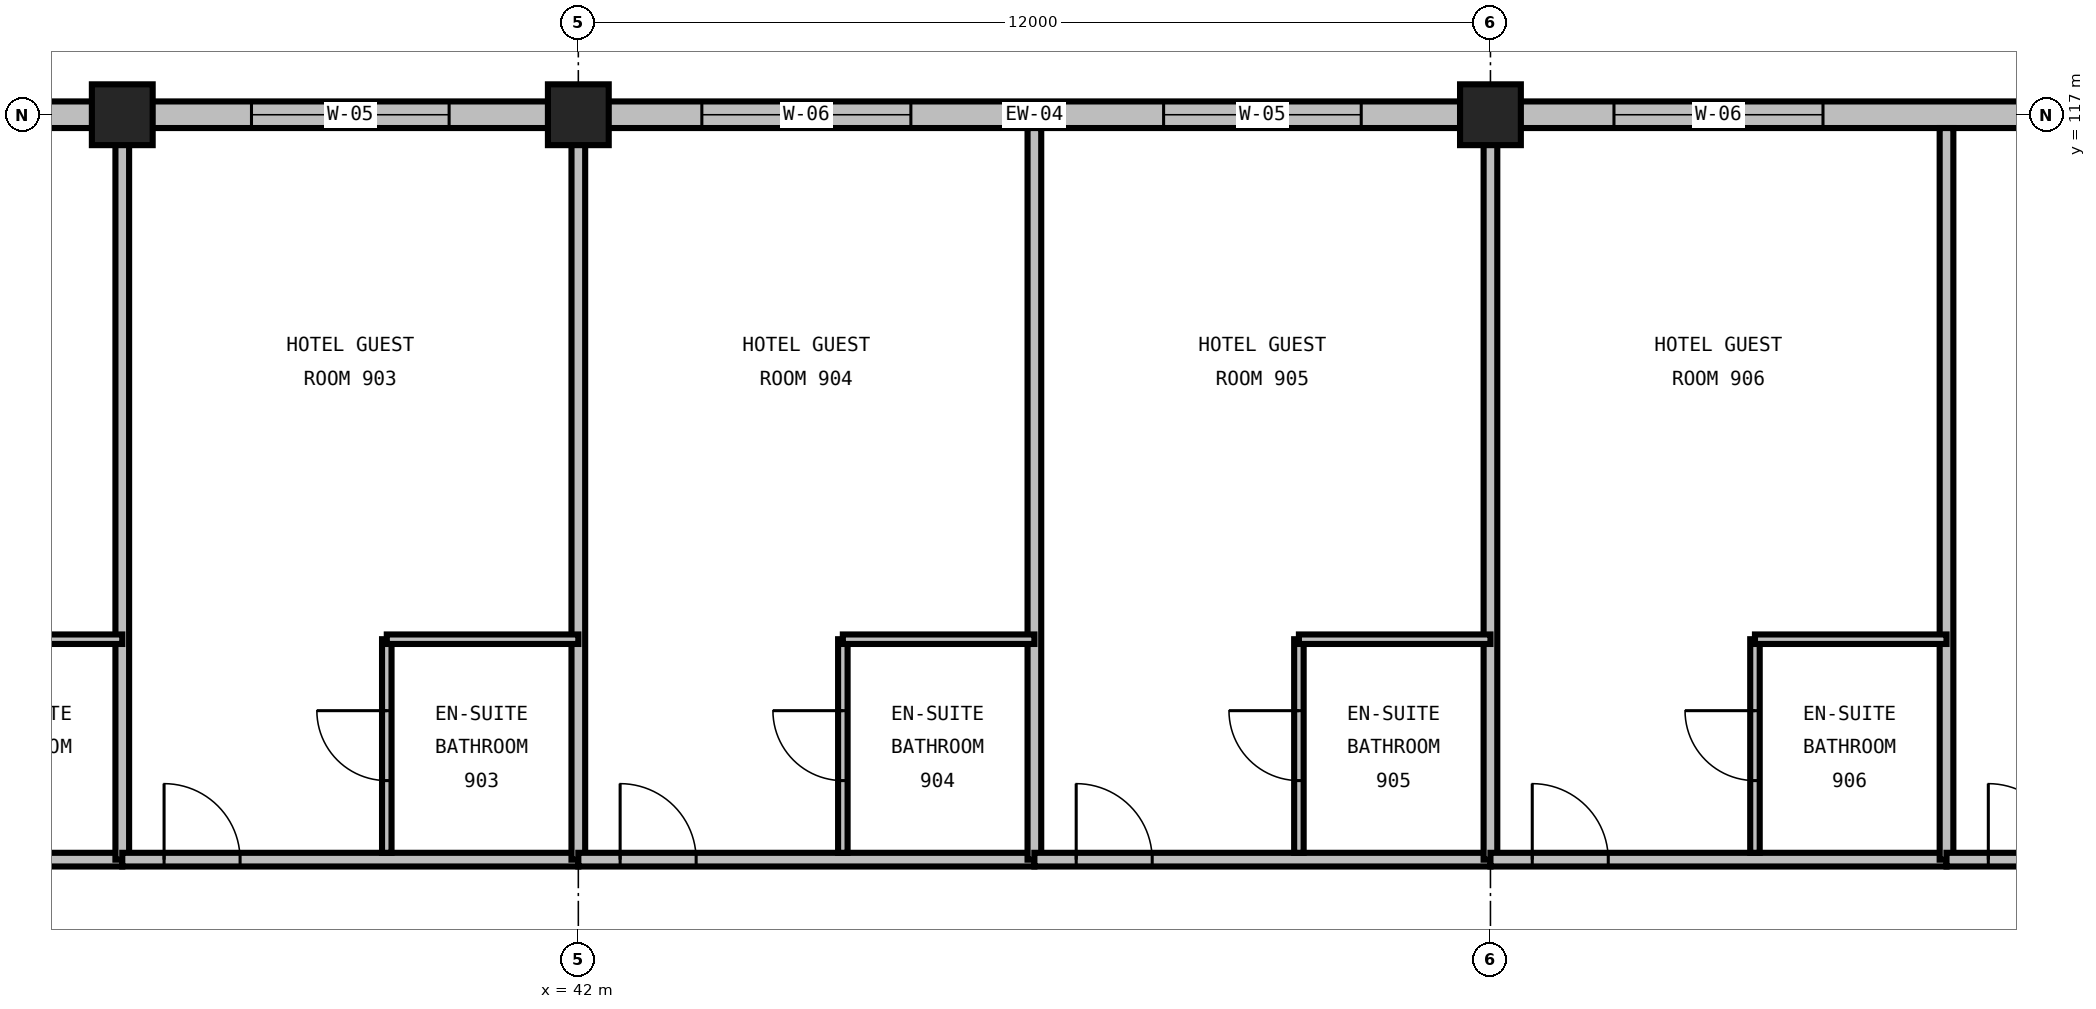
"""IFC4 building model, lengths in metres.
Left out: names, types, materials, properties, quantities, classifications, styles, units other than length and angle.
Written with IfcOpenShell. Run it as: python <this file> out.ifc"""

import sys

from ifc_helpers import new_model, si_unit, direction, frame, frame_2d, origin, origin_2d, place, context, subcontext, project, spatial, rectangle, extrude, element, fill, save


model = new_model("IFC4")
c1 = context("Model", 3, precision=1e-05, world=origin(), true_north=direction((0.0, 1.0)))
c2 = subcontext(c1, "Body", "Model", "MODEL_VIEW")
j1 = project(units=[si_unit("LENGTHUNIT", "METRE"), si_unit("PLANEANGLEUNIT", "RADIAN")], contexts=[c1])
p1 = place(None, origin())
s1 = spatial("IfcSite", under=j1, at=p1, CompositionType="ELEMENT")
p2 = place(p1, origin())
s2 = spatial("IfcBuilding", under=s1, at=p2, CompositionType="ELEMENT")
p3 = place(p2, frame((0.0, 0.0, 42.0)))
s3 = spatial("IfcBuildingStorey", under=s2, at=p3, CompositionType="ELEMENT", Elevation=42.0)
for number, where, z_axis, x_axis in (
    (1, (36.0, 117.0, 0.0), (0.0, 0.0, 1.0), (1.0, 0.0, 0.0)),
    (2, (42.0, 117.0, 0.0), (0.0, 0.0, 1.0), (1.0, 0.0, 0.0)),
    (3, (54.0, 117.0, 0.0), (0.0, 0.0, 1.0), (1.0, 0.0, 0.0)),
):
    element("IfcColumn", number, at=place(p3, frame(where, z_axis=z_axis, x_axis=x_axis)), inside=s3, PredefinedType="COLUMN", context=c2, shape_type="SweptSolid", body=[
        extrude(rectangle(XDim=0.8, YDim=0.8, at=origin_2d()), origin(), (0.0, 0.0, 1.0), 3.6),
    ])
p4 = place(p3, frame((36.0, 117.0, 0.0), z_axis=(0.0, 0.0, 1.0), x_axis=(-1.0, 0.0, 0.0)))
e4 = element("IfcWall", 4, at=p4, inside=s3, PredefinedType="STANDARD", context=c2, shape_type="SweptSolid", body=[
    extrude(rectangle(XDim=6.0, YDim=0.35, at=frame_2d((3.0, 0.0))), origin(), (0.0, 0.0, 1.0), 2.486),
])
p5 = place(p4, frame((1.7, 0.0, 0.72)))
e5 = element("IfcOpeningElement", 5, at=p5, cuts=e4, PredefinedType="OPENING", context=c2, shape_type="SweptSolid", body=[
    extrude(rectangle(XDim=2.6, YDim=1.69, at=frame_2d((1.3, 0.845))), frame((0.0, 0.19, 0.0), z_axis=(0.0, -1.0, 0.0), x_axis=(1.0, 0.0, 0.0)), (0.0, 0.0, 1.0), 0.38),
])
p6 = place(p3, frame((42.0, 117.0, 0.0), z_axis=(0.0, 0.0, 1.0), x_axis=(-1.0, 0.0, 0.0)))
e6 = element("IfcWall", 6, at=p6, inside=s3, PredefinedType="STANDARD", context=c2, shape_type="SweptSolid", body=[
    extrude(rectangle(XDim=6.0, YDim=0.35, at=frame_2d((3.0, 0.0))), origin(), (0.0, 0.0, 1.0), 2.486),
])
p7 = place(p6, frame((1.7, 0.0, 0.72)))
e7 = element("IfcOpeningElement", 7, at=p7, cuts=e6, PredefinedType="OPENING", context=c2, shape_type="SweptSolid", body=[
    extrude(rectangle(XDim=2.6, YDim=1.69, at=frame_2d((1.3, 0.845))), frame((0.0, 0.19, 0.0), z_axis=(0.0, -1.0, 0.0), x_axis=(1.0, 0.0, 0.0)), (0.0, 0.0, 1.0), 0.38),
])
p8 = place(p3, frame((54.0, 117.0, 0.0), z_axis=(0.0, 0.0, 1.0), x_axis=(-1.0, 0.0, 0.0)))
e8 = element("IfcWall", 8, at=p8, inside=s3, PredefinedType="STANDARD", context=c2, shape_type="SweptSolid", body=[
    extrude(rectangle(XDim=12.0, YDim=0.35, at=frame_2d((6.0, 0.0))), origin(), (0.0, 0.0, 1.0), 2.486),
])
p9 = place(p8, frame((1.7, 0.0, 0.72)))
e9 = element("IfcOpeningElement", 9, at=p9, cuts=e8, PredefinedType="OPENING", context=c2, shape_type="SweptSolid", body=[
    extrude(rectangle(XDim=2.6, YDim=1.69, at=frame_2d((1.3, 0.845))), frame((0.0, 0.19, 0.0), z_axis=(0.0, -1.0, 0.0), x_axis=(1.0, 0.0, 0.0)), (0.0, 0.0, 1.0), 0.38),
])
p10 = place(p8, frame((7.625, 0.0, 0.72)))
e10 = element("IfcOpeningElement", 10, at=p10, cuts=e8, PredefinedType="OPENING", context=c2, shape_type="SweptSolid", body=[
    extrude(rectangle(XDim=2.75, YDim=1.69, at=frame_2d((1.375, 0.845))), frame((0.0, 0.19, 0.0), z_axis=(0.0, -1.0, 0.0), x_axis=(1.0, 0.0, 0.0)), (0.0, 0.0, 1.0), 0.38),
])
p11 = place(p3, frame((66.0, 117.0, 0.0), z_axis=(0.0, 0.0, 1.0), x_axis=(-1.0, 0.0, 0.0)))
e11 = element("IfcWall", 11, at=p11, inside=s3, PredefinedType="STANDARD", context=c2, shape_type="SweptSolid", body=[
    extrude(rectangle(XDim=12.0, YDim=0.35, at=frame_2d((6.0, 0.0))), origin(), (0.0, 0.0, 1.0), 2.486),
])
p12 = place(p11, frame((1.7, 0.0, 0.72)))
e12 = element("IfcOpeningElement", 12, at=p12, cuts=e11, PredefinedType="OPENING", context=c2, shape_type="SweptSolid", body=[
    extrude(rectangle(XDim=2.6, YDim=1.69, at=frame_2d((1.3, 0.845))), frame((0.0, 0.19, 0.0), z_axis=(0.0, -1.0, 0.0), x_axis=(1.0, 0.0, 0.0)), (0.0, 0.0, 1.0), 0.38),
])
p13 = place(p11, frame((7.625, 0.0, 0.72)))
e13 = element("IfcOpeningElement", 13, at=p13, cuts=e11, PredefinedType="OPENING", context=c2, shape_type="SweptSolid", body=[
    extrude(rectangle(XDim=2.75, YDim=1.69, at=frame_2d((1.375, 0.845))), frame((0.0, 0.19, 0.0), z_axis=(0.0, -1.0, 0.0), x_axis=(1.0, 0.0, 0.0)), (0.0, 0.0, 1.0), 0.38),
])
p14 = place(p3, frame((30.0, 107.2, 0.0), z_axis=(0.0, 0.0, 1.0), x_axis=(1.0, 0.0, 0.0)))
e14 = element("IfcWall", 14, at=p14, inside=s3, PredefinedType="PARTITIONING", context=c2, shape_type="SweptSolid", body=[
    extrude(rectangle(XDim=6.0, YDim=0.18, at=frame_2d((3.0, 0.0))), origin(), (0.0, 0.0, 1.0), 3.29),
])
p15 = place(p14, frame((0.55, 0.0, 0.0)))
e15 = element("IfcOpeningElement", 15, at=p15, cuts=e14, PredefinedType="OPENING", context=c2, shape_type="SweptSolid", body=[
    extrude(rectangle(XDim=1.0, YDim=2.15, at=frame_2d((0.5, 1.075))), frame((0.0, 0.105, 0.0), z_axis=(0.0, -1.0, 0.0), x_axis=(1.0, 0.0, 0.0)), (0.0, 0.0, 1.0), 0.21),
])
p16 = place(p3, frame((36.0, 107.2, 0.0), z_axis=(0.0, 0.0, 1.0), x_axis=(0.0, 1.0, 0.0)))
e16 = element("IfcWall", 16, at=p16, inside=s3, PredefinedType="PARTITIONING", context=c2, shape_type="SweptSolid", body=[
    extrude(rectangle(XDim=9.625, YDim=0.18, at=frame_2d((4.812, 0.0))), origin(), (0.0, 0.0, 1.0), 2.59),
])
p17 = place(p3, frame((33.48, 110.1, 0.0), z_axis=(0.0, 0.0, 1.0), x_axis=(1.0, 0.0, 0.0)))
e17 = element("IfcWall", 17, at=p17, inside=s3, PredefinedType="PARTITIONING", context=c2, shape_type="SweptSolid", body=[
    extrude(rectangle(XDim=2.52, YDim=0.125, at=frame_2d((1.26, 0.0))), origin(), (0.0, 0.0, 1.0), 3.29),
])
p18 = place(p3, frame((36.0, 107.2, 0.0), z_axis=(0.0, 0.0, 1.0), x_axis=(1.0, 0.0, 0.0)))
e18 = element("IfcWall", 18, at=p18, inside=s3, PredefinedType="PARTITIONING", context=c2, shape_type="SweptSolid", body=[
    extrude(rectangle(XDim=6.0, YDim=0.18, at=frame_2d((3.0, 0.0))), origin(), (0.0, 0.0, 1.0), 3.29),
])
p19 = place(p18, frame((0.55, 0.0, 0.0)))
e19 = element("IfcOpeningElement", 19, at=p19, cuts=e18, PredefinedType="OPENING", context=c2, shape_type="SweptSolid", body=[
    extrude(rectangle(XDim=1.0, YDim=2.15, at=frame_2d((0.5, 1.075))), frame((0.0, 0.105, 0.0), z_axis=(0.0, -1.0, 0.0), x_axis=(1.0, 0.0, 0.0)), (0.0, 0.0, 1.0), 0.21),
])
p20 = place(p3, frame((42.0, 107.2, 0.0), z_axis=(0.0, 0.0, 1.0), x_axis=(0.0, 1.0, 0.0)))
e20 = element("IfcWall", 20, at=p20, inside=s3, PredefinedType="PARTITIONING", context=c2, shape_type="SweptSolid", body=[
    extrude(rectangle(XDim=9.625, YDim=0.18, at=frame_2d((4.812, 0.0))), origin(), (0.0, 0.0, 1.0), 2.59),
])
p21 = place(p3, frame((39.48, 107.29, 0.0), z_axis=(0.0, 0.0, 1.0), x_axis=(0.0, 1.0, 0.0)))
e21 = element("IfcWall", 21, at=p21, inside=s3, PredefinedType="PARTITIONING", context=c2, shape_type="SweptSolid", body=[
    extrude(rectangle(XDim=2.81, YDim=0.125, at=frame_2d((1.405, 0.0))), origin(), (0.0, 0.0, 1.0), 3.29),
])
p22 = place(p21, frame((0.95, 0.0, 0.0)))
e22 = element("IfcOpeningElement", 22, at=p22, cuts=e21, PredefinedType="OPENING", context=c2, shape_type="SweptSolid", body=[
    extrude(rectangle(XDim=0.92, YDim=2.1, at=frame_2d((0.46, 1.05))), frame((0.0, 0.077, 0.0), z_axis=(0.0, -1.0, 0.0), x_axis=(1.0, 0.0, 0.0)), (0.0, 0.0, 1.0), 0.155),
])
p23 = place(p3, frame((39.48, 110.1, 0.0), z_axis=(0.0, 0.0, 1.0), x_axis=(1.0, 0.0, 0.0)))
e23 = element("IfcWall", 23, at=p23, inside=s3, PredefinedType="PARTITIONING", context=c2, shape_type="SweptSolid", body=[
    extrude(rectangle(XDim=2.52, YDim=0.125, at=frame_2d((1.26, 0.0))), origin(), (0.0, 0.0, 1.0), 3.29),
])
p24 = place(p3, frame((42.0, 107.2, 0.0), z_axis=(0.0, 0.0, 1.0), x_axis=(1.0, 0.0, 0.0)))
e24 = element("IfcWall", 24, at=p24, inside=s3, PredefinedType="PARTITIONING", context=c2, shape_type="SweptSolid", body=[
    extrude(rectangle(XDim=6.0, YDim=0.18, at=frame_2d((3.0, 0.0))), origin(), (0.0, 0.0, 1.0), 3.29),
])
p25 = place(p24, frame((0.55, 0.0, 0.0)))
e25 = element("IfcOpeningElement", 25, at=p25, cuts=e24, PredefinedType="OPENING", context=c2, shape_type="SweptSolid", body=[
    extrude(rectangle(XDim=1.0, YDim=2.15, at=frame_2d((0.5, 1.075))), frame((0.0, 0.105, 0.0), z_axis=(0.0, -1.0, 0.0), x_axis=(1.0, 0.0, 0.0)), (0.0, 0.0, 1.0), 0.21),
])
p26 = place(p3, frame((48.0, 107.2, 0.0), z_axis=(0.0, 0.0, 1.0), x_axis=(0.0, 1.0, 0.0)))
e26 = element("IfcWall", 26, at=p26, inside=s3, PredefinedType="PARTITIONING", context=c2, shape_type="SweptSolid", body=[
    extrude(rectangle(XDim=9.625, YDim=0.18, at=frame_2d((4.812, 0.0))), origin(), (0.0, 0.0, 1.0), 3.29),
])
p27 = place(p3, frame((45.48, 107.29, 0.0), z_axis=(0.0, 0.0, 1.0), x_axis=(0.0, 1.0, 0.0)))
e27 = element("IfcWall", 27, at=p27, inside=s3, PredefinedType="PARTITIONING", context=c2, shape_type="SweptSolid", body=[
    extrude(rectangle(XDim=2.81, YDim=0.125, at=frame_2d((1.405, 0.0))), origin(), (0.0, 0.0, 1.0), 3.29),
])
p28 = place(p27, frame((0.95, 0.0, 0.0)))
e28 = element("IfcOpeningElement", 28, at=p28, cuts=e27, PredefinedType="OPENING", context=c2, shape_type="SweptSolid", body=[
    extrude(rectangle(XDim=0.92, YDim=2.1, at=frame_2d((0.46, 1.05))), frame((0.0, 0.077, 0.0), z_axis=(0.0, -1.0, 0.0), x_axis=(1.0, 0.0, 0.0)), (0.0, 0.0, 1.0), 0.155),
])
p29 = place(p3, frame((45.48, 110.1, 0.0), z_axis=(0.0, 0.0, 1.0), x_axis=(1.0, 0.0, 0.0)))
e29 = element("IfcWall", 29, at=p29, inside=s3, PredefinedType="PARTITIONING", context=c2, shape_type="SweptSolid", body=[
    extrude(rectangle(XDim=2.52, YDim=0.125, at=frame_2d((1.26, 0.0))), origin(), (0.0, 0.0, 1.0), 3.29),
])
p30 = place(p3, frame((48.0, 107.2, 0.0), z_axis=(0.0, 0.0, 1.0), x_axis=(1.0, 0.0, 0.0)))
e30 = element("IfcWall", 30, at=p30, inside=s3, PredefinedType="PARTITIONING", context=c2, shape_type="SweptSolid", body=[
    extrude(rectangle(XDim=6.0, YDim=0.18, at=frame_2d((3.0, 0.0))), origin(), (0.0, 0.0, 1.0), 3.29),
])
p31 = place(p30, frame((0.55, 0.0, 0.0)))
e31 = element("IfcOpeningElement", 31, at=p31, cuts=e30, PredefinedType="OPENING", context=c2, shape_type="SweptSolid", body=[
    extrude(rectangle(XDim=1.0, YDim=2.15, at=frame_2d((0.5, 1.075))), frame((0.0, 0.105, 0.0), z_axis=(0.0, -1.0, 0.0), x_axis=(1.0, 0.0, 0.0)), (0.0, 0.0, 1.0), 0.21),
])
p32 = place(p3, frame((54.0, 107.2, 0.0), z_axis=(0.0, 0.0, 1.0), x_axis=(0.0, 1.0, 0.0)))
e32 = element("IfcWall", 32, at=p32, inside=s3, PredefinedType="PARTITIONING", context=c2, shape_type="SweptSolid", body=[
    extrude(rectangle(XDim=9.625, YDim=0.18, at=frame_2d((4.812, 0.0))), origin(), (0.0, 0.0, 1.0), 2.59),
])
p33 = place(p3, frame((51.48, 107.29, 0.0), z_axis=(0.0, 0.0, 1.0), x_axis=(0.0, 1.0, 0.0)))
e33 = element("IfcWall", 33, at=p33, inside=s3, PredefinedType="PARTITIONING", context=c2, shape_type="SweptSolid", body=[
    extrude(rectangle(XDim=2.81, YDim=0.125, at=frame_2d((1.405, 0.0))), origin(), (0.0, 0.0, 1.0), 3.29),
])
p34 = place(p33, frame((0.95, 0.0, 0.0)))
e34 = element("IfcOpeningElement", 34, at=p34, cuts=e33, PredefinedType="OPENING", context=c2, shape_type="SweptSolid", body=[
    extrude(rectangle(XDim=0.92, YDim=2.1, at=frame_2d((0.46, 1.05))), frame((0.0, 0.077, 0.0), z_axis=(0.0, -1.0, 0.0), x_axis=(1.0, 0.0, 0.0)), (0.0, 0.0, 1.0), 0.155),
])
p35 = place(p3, frame((51.48, 110.1, 0.0), z_axis=(0.0, 0.0, 1.0), x_axis=(1.0, 0.0, 0.0)))
e35 = element("IfcWall", 35, at=p35, inside=s3, PredefinedType="PARTITIONING", context=c2, shape_type="SweptSolid", body=[
    extrude(rectangle(XDim=2.52, YDim=0.125, at=frame_2d((1.26, 0.0))), origin(), (0.0, 0.0, 1.0), 3.29),
])
p36 = place(p3, frame((54.0, 107.2, 0.0), z_axis=(0.0, 0.0, 1.0), x_axis=(1.0, 0.0, 0.0)))
e36 = element("IfcWall", 36, at=p36, inside=s3, PredefinedType="PARTITIONING", context=c2, shape_type="SweptSolid", body=[
    extrude(rectangle(XDim=6.0, YDim=0.18, at=frame_2d((3.0, 0.0))), origin(), (0.0, 0.0, 1.0), 3.29),
])
p37 = place(p36, frame((0.55, 0.0, 0.0)))
e37 = element("IfcOpeningElement", 37, at=p37, cuts=e36, PredefinedType="OPENING", context=c2, shape_type="SweptSolid", body=[
    extrude(rectangle(XDim=1.0, YDim=2.15, at=frame_2d((0.5, 1.075))), frame((0.0, 0.105, 0.0), z_axis=(0.0, -1.0, 0.0), x_axis=(1.0, 0.0, 0.0)), (0.0, 0.0, 1.0), 0.21),
])
p38 = place(p3, frame((60.0, 107.2, 0.0), z_axis=(0.0, 0.0, 1.0), x_axis=(0.0, 1.0, 0.0)))
e38 = element("IfcWall", 38, at=p38, inside=s3, PredefinedType="PARTITIONING", context=c2, shape_type="SweptSolid", body=[
    extrude(rectangle(XDim=9.625, YDim=0.18, at=frame_2d((4.812, 0.0))), origin(), (0.0, 0.0, 1.0), 3.29),
])
p39 = place(p3, frame((57.48, 107.29, 0.0), z_axis=(0.0, 0.0, 1.0), x_axis=(0.0, 1.0, 0.0)))
e39 = element("IfcWall", 39, at=p39, inside=s3, PredefinedType="PARTITIONING", context=c2, shape_type="SweptSolid", body=[
    extrude(rectangle(XDim=2.81, YDim=0.125, at=frame_2d((1.405, 0.0))), origin(), (0.0, 0.0, 1.0), 3.29),
])
p40 = place(p39, frame((0.95, 0.0, 0.0)))
e40 = element("IfcOpeningElement", 40, at=p40, cuts=e39, PredefinedType="OPENING", context=c2, shape_type="SweptSolid", body=[
    extrude(rectangle(XDim=0.92, YDim=2.1, at=frame_2d((0.46, 1.05))), frame((0.0, 0.077, 0.0), z_axis=(0.0, -1.0, 0.0), x_axis=(1.0, 0.0, 0.0)), (0.0, 0.0, 1.0), 0.155),
])
p41 = place(p3, frame((57.48, 110.1, 0.0), z_axis=(0.0, 0.0, 1.0), x_axis=(1.0, 0.0, 0.0)))
e41 = element("IfcWall", 41, at=p41, inside=s3, PredefinedType="PARTITIONING", context=c2, shape_type="SweptSolid", body=[
    extrude(rectangle(XDim=2.52, YDim=0.125, at=frame_2d((1.26, 0.0))), origin(), (0.0, 0.0, 1.0), 3.29),
])
p42 = place(p3, frame((60.0, 107.2, 0.0), z_axis=(0.0, 0.0, 1.0), x_axis=(1.0, 0.0, 0.0)))
e42 = element("IfcWall", 42, at=p42, inside=s3, PredefinedType="PARTITIONING", context=c2, shape_type="SweptSolid", body=[
    extrude(rectangle(XDim=6.0, YDim=0.18, at=frame_2d((3.0, 0.0))), origin(), (0.0, 0.0, 1.0), 3.29),
])
p43 = place(p42, frame((0.55, 0.0, 0.0)))
e43 = element("IfcOpeningElement", 43, at=p43, cuts=e42, PredefinedType="OPENING", context=c2, shape_type="SweptSolid", body=[
    extrude(rectangle(XDim=1.0, YDim=2.15, at=frame_2d((0.5, 1.075))), frame((0.0, 0.105, 0.0), z_axis=(0.0, -1.0, 0.0), x_axis=(1.0, 0.0, 0.0)), (0.0, 0.0, 1.0), 0.21),
])
p44 = place(p7, origin())
e44 = element("IfcWindow", 44, at=p44, inside=s3, PartitioningType="DOUBLE_PANEL_VERTICAL", PredefinedType="WINDOW", context=c2, shape_type="SweptSolid", body=[
    extrude(rectangle(XDim=2.6, YDim=1.69, at=frame_2d((1.3, 0.845))), frame((0.0, 0.03, 0.0), z_axis=(0.0, -1.0, 0.0), x_axis=(1.0, 0.0, 0.0)), (0.0, 0.0, 1.0), 0.06),
])
fill(e7, e44)
p45 = place(p9, origin())
e45 = element("IfcWindow", 45, at=p45, inside=s3, PartitioningType="DOUBLE_PANEL_VERTICAL", PredefinedType="WINDOW", context=c2, shape_type="SweptSolid", body=[
    extrude(rectangle(XDim=2.6, YDim=1.69, at=frame_2d((1.3, 0.845))), frame((0.0, 0.03, 0.0), z_axis=(0.0, -1.0, 0.0), x_axis=(1.0, 0.0, 0.0)), (0.0, 0.0, 1.0), 0.06),
])
fill(e9, e45)
p46 = place(p10, origin())
e46 = element("IfcWindow", 46, at=p46, inside=s3, PartitioningType="TRIPLE_PANEL_VERTICAL", PredefinedType="WINDOW", context=c2, shape_type="SweptSolid", body=[
    extrude(rectangle(XDim=2.75, YDim=1.69, at=frame_2d((1.375, 0.845))), frame((0.0, 0.03, 0.0), z_axis=(0.0, -1.0, 0.0), x_axis=(1.0, 0.0, 0.0)), (0.0, 0.0, 1.0), 0.06),
])
fill(e10, e46)
p47 = place(p13, origin())
e47 = element("IfcWindow", 47, at=p47, inside=s3, PartitioningType="TRIPLE_PANEL_VERTICAL", PredefinedType="WINDOW", context=c2, shape_type="SweptSolid", body=[
    extrude(rectangle(XDim=2.75, YDim=1.69, at=frame_2d((1.375, 0.845))), frame((0.0, 0.03, 0.0), z_axis=(0.0, -1.0, 0.0), x_axis=(1.0, 0.0, 0.0)), (0.0, 0.0, 1.0), 0.06),
])
fill(e13, e47)
p48 = place(p19, origin())
e48 = element("IfcDoor", 48, at=p48, inside=s3, OperationType="SINGLE_SWING_LEFT", PredefinedType="DOOR", context=c2, shape_type="SweptSolid", body=[
    extrude(rectangle(XDim=1.0, YDim=2.15, at=frame_2d((0.5, 1.075))), frame((0.0, 0.025, 0.0), z_axis=(0.0, -1.0, 0.0), x_axis=(1.0, 0.0, 0.0)), (0.0, 0.0, 1.0), 0.05),
])
fill(e19, e48)
p49 = place(p22, origin())
e49 = element("IfcDoor", 49, at=p49, inside=s3, OperationType="SINGLE_SWING_RIGHT", PredefinedType="DOOR", context=c2, shape_type="SweptSolid", body=[
    extrude(rectangle(XDim=0.92, YDim=2.1, at=frame_2d((0.46, 1.05))), frame((0.0, 0.025, 0.0), z_axis=(0.0, -1.0, 0.0), x_axis=(1.0, 0.0, 0.0)), (0.0, 0.0, 1.0), 0.05),
])
fill(e22, e49)
p50 = place(p25, origin())
e50 = element("IfcDoor", 50, at=p50, inside=s3, OperationType="SINGLE_SWING_LEFT", PredefinedType="DOOR", context=c2, shape_type="SweptSolid", body=[
    extrude(rectangle(XDim=1.0, YDim=2.15, at=frame_2d((0.5, 1.075))), frame((0.0, 0.025, 0.0), z_axis=(0.0, -1.0, 0.0), x_axis=(1.0, 0.0, 0.0)), (0.0, 0.0, 1.0), 0.05),
])
fill(e25, e50)
p51 = place(p28, origin())
e51 = element("IfcDoor", 51, at=p51, inside=s3, OperationType="SINGLE_SWING_RIGHT", PredefinedType="DOOR", context=c2, shape_type="SweptSolid", body=[
    extrude(rectangle(XDim=0.92, YDim=2.1, at=frame_2d((0.46, 1.05))), frame((0.0, 0.025, 0.0), z_axis=(0.0, -1.0, 0.0), x_axis=(1.0, 0.0, 0.0)), (0.0, 0.0, 1.0), 0.05),
])
fill(e28, e51)
p52 = place(p31, origin())
e52 = element("IfcDoor", 52, at=p52, inside=s3, OperationType="SINGLE_SWING_LEFT", PredefinedType="DOOR", context=c2, shape_type="SweptSolid", body=[
    extrude(rectangle(XDim=1.0, YDim=2.15, at=frame_2d((0.5, 1.075))), frame((0.0, 0.025, 0.0), z_axis=(0.0, -1.0, 0.0), x_axis=(1.0, 0.0, 0.0)), (0.0, 0.0, 1.0), 0.05),
])
fill(e31, e52)
p53 = place(p34, origin())
e53 = element("IfcDoor", 53, at=p53, inside=s3, OperationType="SINGLE_SWING_RIGHT", PredefinedType="DOOR", context=c2, shape_type="SweptSolid", body=[
    extrude(rectangle(XDim=0.92, YDim=2.1, at=frame_2d((0.46, 1.05))), frame((0.0, 0.025, 0.0), z_axis=(0.0, -1.0, 0.0), x_axis=(1.0, 0.0, 0.0)), (0.0, 0.0, 1.0), 0.05),
])
fill(e34, e53)
p54 = place(p37, origin())
e54 = element("IfcDoor", 54, at=p54, inside=s3, OperationType="SINGLE_SWING_LEFT", PredefinedType="DOOR", context=c2, shape_type="SweptSolid", body=[
    extrude(rectangle(XDim=1.0, YDim=2.15, at=frame_2d((0.5, 1.075))), frame((0.0, 0.025, 0.0), z_axis=(0.0, -1.0, 0.0), x_axis=(1.0, 0.0, 0.0)), (0.0, 0.0, 1.0), 0.05),
])
fill(e37, e54)
p55 = place(p40, origin())
e55 = element("IfcDoor", 55, at=p55, inside=s3, OperationType="SINGLE_SWING_RIGHT", PredefinedType="DOOR", context=c2, shape_type="SweptSolid", body=[
    extrude(rectangle(XDim=0.92, YDim=2.1, at=frame_2d((0.46, 1.05))), frame((0.0, 0.025, 0.0), z_axis=(0.0, -1.0, 0.0), x_axis=(1.0, 0.0, 0.0)), (0.0, 0.0, 1.0), 0.05),
])
fill(e40, e55)
p56 = place(p43, origin())
e56 = element("IfcDoor", 56, at=p56, inside=s3, OperationType="SINGLE_SWING_LEFT", PredefinedType="DOOR", context=c2, shape_type="SweptSolid", body=[
    extrude(rectangle(XDim=1.0, YDim=2.15, at=frame_2d((0.5, 1.075))), frame((0.0, 0.025, 0.0), z_axis=(0.0, -1.0, 0.0), x_axis=(1.0, 0.0, 0.0)), (0.0, 0.0, 1.0), 0.05),
])
fill(e43, e56)
save(model, sys.argv[1])
